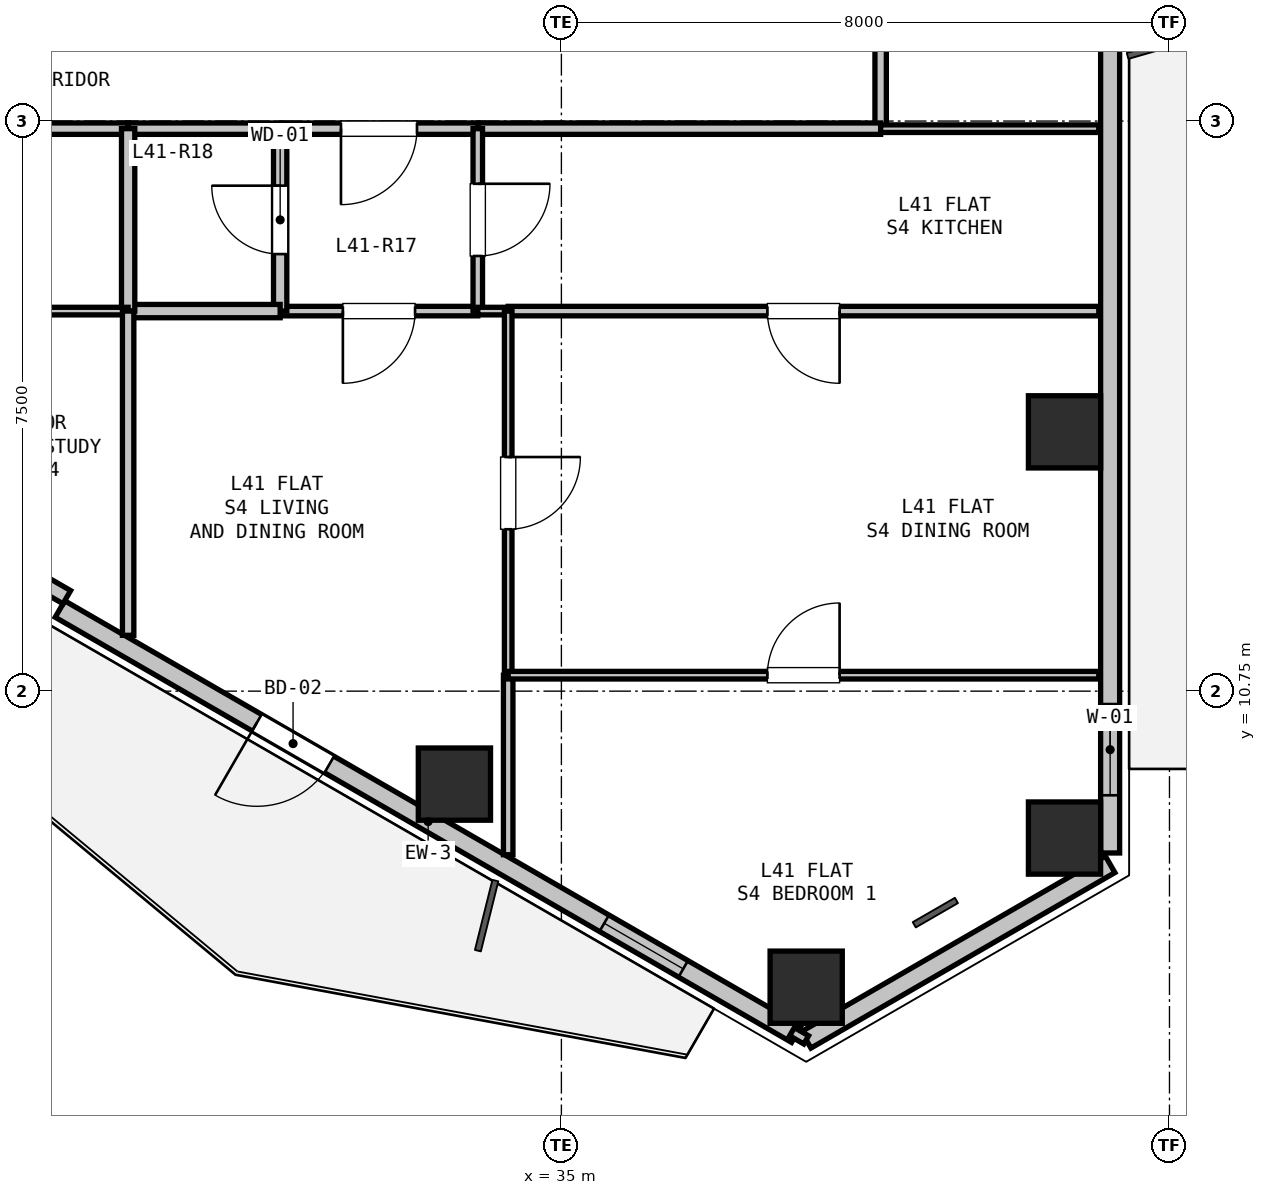
"""IFC4 building model, lengths in metres.
Left out: names, types, materials, properties, quantities, classifications, styles, units other than length and angle.
Written with IfcOpenShell. Run it as: python <this file> out.ifc"""

import sys

from ifc_helpers import new_model, si_unit, direction, frame, frame_2d, origin, origin_2d, place, context, subcontext, project, spatial, rectangle, hollow_rectangle, extrude, element, fill, save


model = new_model("IFC4")
c1 = context("Model", 3, precision=1e-05, world=origin(), true_north=direction((0.0, 1.0)))
c2 = subcontext(c1, "Body", "Model", "MODEL_VIEW")
j1 = project(units=[si_unit("LENGTHUNIT", "METRE"), si_unit("PLANEANGLEUNIT", "RADIAN")], contexts=[c1])
p1 = place(None, origin())
s1 = spatial("IfcSite", under=j1, at=p1, CompositionType="ELEMENT")
p2 = place(p1, origin())
s2 = spatial("IfcBuilding", under=s1, at=p2, CompositionType="ELEMENT")
p3 = place(p2, frame((0.0, 0.0, 147.6)))
s3 = spatial("IfcBuildingStorey", under=s2, at=p3, CompositionType="ELEMENT", Elevation=147.6)
for number, where, z_axis, x_axis in (
    (1, (41.619, 14.161, 0.0), (0.0, 0.0, 1.0), (1.0, 0.0, 0.0)),
    (2, (41.619, 8.817, 0.0), (0.0, 0.0, 1.0), (1.0, 0.0, 0.0)),
    (3, (38.22, 6.855, 0.0), (0.0, 0.0, 1.0), (1.0, 0.0, 0.0)),
    (4, (33.593, 9.527, 0.0), (0.0, 0.0, 1.0), (1.0, 0.0, 0.0)),
):
    element("IfcColumn", number, at=place(p3, frame(where, z_axis=z_axis, x_axis=x_axis)), inside=s3, PredefinedType="COLUMN", context=c2, shape_type="SweptSolid", body=[
        extrude(hollow_rectangle(XDim=0.95, YDim=0.95, WallThickness=0.028, at=origin_2d()), origin(), (0.0, 0.0, 1.0), 3.3),
    ])
p4 = place(p3, frame((42.219, 8.471, 0.0), z_axis=(0.0, 0.0, 1.0), x_axis=(-0.866035021055, -0.499983342029, 0.0)))
e5 = element("IfcWall", 5, at=p4, inside=s3, PredefinedType="SOLIDWALL", context=c2, shape_type="SweptSolid", body=[
    extrude(rectangle(XDim=4.617, YDim=0.25, at=frame_2d((2.309, 0.0))), origin(), (0.0, 0.0, 1.0), 2.68),
])
p5 = place(p3, frame((42.219, 19.807, 0.0), z_axis=(0.0, 0.0, 1.0), x_axis=(0.0, -1.0, 0.0)))
e6 = element("IfcWall", 6, at=p5, inside=s3, PredefinedType="SOLIDWALL", context=c2, shape_type="SweptSolid", body=[
    extrude(rectangle(XDim=11.186, YDim=0.25, at=frame_2d((5.593, 0.0))), origin(), (0.0, 0.0, 1.0), 2.68),
])
p6 = place(p5, frame((9.227, 0.0, 0.9)))
e7 = element("IfcOpeningElement", 7, at=p6, cuts=e6, PredefinedType="OPENING", context=c2, shape_type="SweptSolid", body=[
    extrude(rectangle(XDim=1.2, YDim=1.4, at=frame_2d((0.6, 0.7))), frame((0.0, 0.135, 0.0), z_axis=(0.0, -1.0, 0.0), x_axis=(1.0, 0.0, 0.0)), (0.0, 0.0, 1.0), 0.27),
])
p7 = place(p3, frame((38.091, 6.237, 0.0), z_axis=(0.0, 0.0, 1.0), x_axis=(-0.86602239209, 0.500005216371, 0.0)))
e8 = element("IfcWall", 8, at=p7, inside=s3, PredefinedType="SOLIDWALL", context=c2, shape_type="SweptSolid", body=[
    extrude(rectangle(XDim=11.186, YDim=0.25, at=frame_2d((5.593, 0.0))), origin(), (0.0, 0.0, 1.0), 2.68),
])
p8 = place(p7, frame((7.095, 0.0, 0.0)))
e9 = element("IfcOpeningElement", 9, at=p8, cuts=e8, PredefinedType="OPENING", context=c2, shape_type="SweptSolid", body=[
    extrude(rectangle(XDim=1.1, YDim=2.1, at=frame_2d((0.55, 1.05))), frame((0.0, 0.135, 0.0), z_axis=(0.0, -1.0, 0.0), x_axis=(1.0, 0.0, 0.0)), (0.0, 0.0, 1.0), 0.27),
])
p9 = place(p7, frame((1.718, 0.0, 0.9)))
e10 = element("IfcOpeningElement", 10, at=p9, cuts=e8, PredefinedType="OPENING", context=c2, shape_type="SweptSolid", body=[
    extrude(rectangle(XDim=1.2, YDim=1.4, at=frame_2d((0.6, 0.7))), frame((0.0, 0.135, 0.0), z_axis=(0.0, -1.0, 0.0), x_axis=(1.0, 0.0, 0.0)), (0.0, 0.0, 1.0), 0.27),
])
p10 = place(p3, frame((28.493, 11.986, 0.0), z_axis=(0.0, 0.0, 1.0), x_axis=(-0.86605165483, 0.499954529098, 0.0)))
e11 = element("IfcWall", 11, at=p10, inside=s3, PredefinedType="PARAPET", context=c2, shape_type="SweptSolid", body=[
    extrude(rectangle(XDim=1.7, YDim=0.2, at=frame_2d((0.85, 0.0))), origin(), (0.0, 0.0, 1.0), 2.68),
])
p11 = place(p3, frame((39.2, 19.9, 0.0), z_axis=(0.0, 0.0, 1.0), x_axis=(0.0, -1.0, 0.0)))
e12 = element("IfcWall", 12, at=p11, inside=s3, PredefinedType="PARTITIONING", context=c2, shape_type="SweptSolid", body=[
    extrude(rectangle(XDim=1.75, YDim=0.15, at=frame_2d((0.875, 0.0))), origin(), (0.0, 0.0, 1.0), 3.06),
])
p12 = place(p3, frame((39.2, 18.15, 0.0), z_axis=(0.0, 0.0, 1.0), x_axis=(-1.0, 0.0, 0.0)))
e13 = element("IfcWall", 13, at=p12, inside=s3, PredefinedType="PARTITIONING", context=c2, shape_type="SweptSolid", body=[
    extrude(rectangle(XDim=5.3, YDim=0.15, at=frame_2d((2.65, 0.0))), origin(), (0.0, 0.0, 1.0), 2.433),
])
p13 = place(p3, frame((33.9, 18.15, 0.0), z_axis=(0.0, 0.0, 1.0), x_axis=(-1.0, 0.0, 0.0)))
e14 = element("IfcWall", 14, at=p13, inside=s3, PredefinedType="PARTITIONING", context=c2, shape_type="SweptSolid", body=[
    extrude(rectangle(XDim=2.6, YDim=0.15, at=frame_2d((1.3, 0.0))), origin(), (0.0, 0.0, 1.0), 3.06),
])
p14 = place(p13, frame((0.8, 0.0, 0.0)))
e15 = element("IfcOpeningElement", 15, at=p14, cuts=e14, PredefinedType="OPENING", context=c2, shape_type="SweptSolid", body=[
    extrude(rectangle(XDim=1.0, YDim=2.15, at=frame_2d((0.5, 1.075))), frame((0.0, 0.085, 0.0), z_axis=(0.0, -1.0, 0.0), x_axis=(1.0, 0.0, 0.0)), (0.0, 0.0, 1.0), 0.17),
])
p15 = place(p3, frame((31.3, 18.15, 0.0), z_axis=(0.0, 0.0, 1.0), x_axis=(-1.0, 0.0, 0.0)))
e16 = element("IfcWall", 16, at=p15, inside=s3, PredefinedType="PARTITIONING", context=c2, shape_type="SweptSolid", body=[
    extrude(rectangle(XDim=2.0, YDim=0.15, at=frame_2d((1.0, 0.0))), origin(), (0.0, 0.0, 1.0), 3.06),
])
p16 = place(p3, frame((29.3, 18.15, 0.0), z_axis=(0.0, 0.0, 1.0), x_axis=(-1.0, 0.0, 0.0)))
e17 = element("IfcWall", 17, at=p16, inside=s3, PredefinedType="PARTITIONING", context=c2, shape_type="SweptSolid", body=[
    extrude(rectangle(XDim=2.2, YDim=0.15, at=frame_2d((1.1, 0.0))), origin(), (0.0, 0.0, 1.0), 3.06),
])
p17 = place(p3, frame((33.9, 15.75, 0.0), z_axis=(0.0, 0.0, 1.0), x_axis=(-1.0, 0.0, 0.0)))
e18 = element("IfcWall", 18, at=p17, inside=s3, PredefinedType="PARTITIONING", context=c2, shape_type="SweptSolid", body=[
    extrude(rectangle(XDim=2.6, YDim=0.125, at=frame_2d((1.3, 0.0))), origin(), (0.0, 0.0, 1.0), 3.06),
])
p18 = place(p17, frame((0.825, 0.0, 0.0)))
e19 = element("IfcOpeningElement", 19, at=p18, cuts=e18, PredefinedType="OPENING", context=c2, shape_type="SweptSolid", body=[
    extrude(rectangle(XDim=0.95, YDim=2.1, at=frame_2d((0.475, 1.05))), frame((0.0, 0.073, 0.0), z_axis=(0.0, -1.0, 0.0), x_axis=(1.0, 0.0, 0.0)), (0.0, 0.0, 1.0), 0.145),
])
p19 = place(p3, frame((31.3, 15.75, 0.0), z_axis=(0.0, 0.0, 1.0), x_axis=(0.0, 1.0, 0.0)))
e20 = element("IfcWall", 20, at=p19, inside=s3, PredefinedType="PLUMBINGWALL", context=c2, shape_type="SweptSolid", body=[
    extrude(rectangle(XDim=2.4, YDim=0.175, at=frame_2d((1.2, 0.0))), origin(), (0.0, 0.0, 1.0), 3.06),
])
p20 = place(p19, frame((0.75, 0.0, 0.0)))
e21 = element("IfcOpeningElement", 21, at=p20, cuts=e20, PredefinedType="OPENING", context=c2, shape_type="SweptSolid", body=[
    extrude(rectangle(XDim=0.9, YDim=2.1, at=frame_2d((0.45, 1.05))), frame((0.0, 0.097, 0.0), z_axis=(0.0, -1.0, 0.0), x_axis=(1.0, 0.0, 0.0)), (0.0, 0.0, 1.0), 0.195),
])
p21 = place(p3, frame((33.9, 18.15, 0.0), z_axis=(0.0, 0.0, 1.0), x_axis=(0.0, -1.0, 0.0)))
e22 = element("IfcWall", 22, at=p21, inside=s3, PredefinedType="PARTITIONING", context=c2, shape_type="SweptSolid", body=[
    extrude(rectangle(XDim=2.4, YDim=0.125, at=frame_2d((1.2, 0.0))), origin(), (0.0, 0.0, 1.0), 3.06),
])
p22 = place(p21, frame((0.725, 0.0, 0.0)))
e23 = element("IfcOpeningElement", 23, at=p22, cuts=e22, PredefinedType="OPENING", context=c2, shape_type="SweptSolid", body=[
    extrude(rectangle(XDim=0.95, YDim=2.1, at=frame_2d((0.475, 1.05))), frame((0.0, 0.073, 0.0), z_axis=(0.0, -1.0, 0.0), x_axis=(1.0, 0.0, 0.0)), (0.0, 0.0, 1.0), 0.145),
])
p23 = place(p3, frame((31.3, 15.75, 0.0), z_axis=(0.0, 0.0, 1.0), x_axis=(-1.0, 0.0, 0.0)))
e24 = element("IfcWall", 24, at=p23, inside=s3, PredefinedType="PLUMBINGWALL", context=c2, shape_type="SweptSolid", body=[
    extrude(rectangle(XDim=2.0, YDim=0.175, at=frame_2d((1.0, 0.0))), origin(), (0.0, 0.0, 1.0), 3.06),
])
p24 = place(p3, frame((29.3, 15.75, 0.0), z_axis=(0.0, 0.0, 1.0), x_axis=(0.0, 1.0, 0.0)))
e25 = element("IfcWall", 25, at=p24, inside=s3, PredefinedType="PLUMBINGWALL", context=c2, shape_type="SweptSolid", body=[
    extrude(rectangle(XDim=2.4, YDim=0.175, at=frame_2d((1.2, 0.0))), origin(), (0.0, 0.0, 1.0), 3.06),
])
p25 = place(p3, frame((39.2, 18.15, 0.0), z_axis=(0.0, 0.0, 1.0), x_axis=(1.0, 0.0, 0.0)))
e26 = element("IfcWall", 26, at=p25, inside=s3, PredefinedType="PARTITIONING", context=c2, shape_type="SweptSolid", body=[
    extrude(rectangle(XDim=2.87, YDim=0.1, at=frame_2d((1.435, 0.0))), origin(), (0.0, 0.0, 1.0), 2.365),
])
p26 = place(p3, frame((42.07, 15.75, 0.0), z_axis=(0.0, 0.0, 1.0), x_axis=(-1.0, 0.0, 0.0)))
e27 = element("IfcWall", 27, at=p26, inside=s3, PredefinedType="PARTITIONING", context=c2, shape_type="SweptSolid", body=[
    extrude(rectangle(XDim=7.77, YDim=0.125, at=frame_2d((3.885, 0.0))), origin(), (0.0, 0.0, 1.0), 2.365),
])
p27 = place(p26, frame((3.41, 0.0, 0.0)))
e28 = element("IfcOpeningElement", 28, at=p27, cuts=e27, PredefinedType="OPENING", context=c2, shape_type="SweptSolid", body=[
    extrude(rectangle(XDim=0.95, YDim=2.1, at=frame_2d((0.475, 1.05))), frame((0.0, 0.073, 0.0), z_axis=(0.0, -1.0, 0.0), x_axis=(1.0, 0.0, 0.0)), (0.0, 0.0, 1.0), 0.145),
])
p28 = place(p3, frame((34.3, 15.75, 0.0), z_axis=(0.0, 0.0, 1.0), x_axis=(-1.0, 0.0, 0.0)))
e29 = element("IfcWall", 29, at=p28, inside=s3, PredefinedType="PARTITIONING", context=c2, shape_type="SweptSolid", body=[
    extrude(rectangle(XDim=0.4, YDim=0.1, at=frame_2d((0.2, 0.0))), origin(), (0.0, 0.0, 1.0), 3.06),
])
p29 = place(p3, frame((27.1, 15.75, 0.0), z_axis=(0.0, 0.0, 1.0), x_axis=(1.0, 0.0, 0.0)))
e30 = element("IfcWall", 30, at=p29, inside=s3, PredefinedType="PARTITIONING", context=c2, shape_type="SweptSolid", body=[
    extrude(rectangle(XDim=2.2, YDim=0.1, at=frame_2d((1.1, 0.0))), origin(), (0.0, 0.0, 1.0), 2.433),
])
p30 = place(p3, frame((29.3, 15.75, 0.0), z_axis=(0.0, 0.0, 1.0), x_axis=(0.0, -1.0, 0.0)))
e31 = element("IfcWall", 31, at=p30, inside=s3, PredefinedType="PARTITIONING", context=c2, shape_type="SweptSolid", body=[
    extrude(rectangle(XDim=4.265, YDim=0.15, at=frame_2d((2.133, 0.0))), origin(), (0.0, 0.0, 1.0), 2.365),
])
p31 = place(p3, frame((34.3, 15.75, 0.0), z_axis=(0.0, 0.0, 1.0), x_axis=(0.0, -1.0, 0.0)))
e32 = element("IfcWall", 32, at=p31, inside=s3, PredefinedType="PARTITIONING", context=c2, shape_type="SweptSolid", body=[
    extrude(rectangle(XDim=4.79, YDim=0.1, at=frame_2d((2.395, 0.0))), origin(), (0.0, 0.0, 1.0), 3.06),
])
p32 = place(p31, frame((1.92, 0.0, 0.0)))
e33 = element("IfcOpeningElement", 33, at=p32, cuts=e32, PredefinedType="OPENING", context=c2, shape_type="SweptSolid", body=[
    extrude(rectangle(XDim=0.95, YDim=2.1, at=frame_2d((0.475, 1.05))), frame((0.0, 0.06, 0.0), z_axis=(0.0, -1.0, 0.0), x_axis=(1.0, 0.0, 0.0)), (0.0, 0.0, 1.0), 0.12),
])
p33 = place(p3, frame((34.3, 10.96, 0.0), z_axis=(0.0, 0.0, 1.0), x_axis=(0.0, -1.0, 0.0)))
e34 = element("IfcWall", 34, at=p33, inside=s3, PredefinedType="PARTITIONING", context=c2, shape_type="SweptSolid", body=[
    extrude(rectangle(XDim=2.362, YDim=0.125, at=frame_2d((1.181, 0.0))), origin(), (0.0, 0.0, 1.0), 2.724),
])
p34 = place(p3, frame((34.3, 10.96, 0.0), z_axis=(0.0, 0.0, 1.0), x_axis=(1.0, 0.0, 0.0)))
e35 = element("IfcWall", 35, at=p34, inside=s3, PredefinedType="PARTITIONING", context=c2, shape_type="SweptSolid", body=[
    extrude(rectangle(XDim=7.77, YDim=0.1, at=frame_2d((3.885, 0.0))), origin(), (0.0, 0.0, 1.0), 2.433),
])
p35 = place(p34, frame((3.41, 0.0, 0.0)))
e36 = element("IfcOpeningElement", 36, at=p35, cuts=e35, PredefinedType="OPENING", context=c2, shape_type="SweptSolid", body=[
    extrude(rectangle(XDim=0.95, YDim=2.1, at=frame_2d((0.475, 1.05))), frame((0.0, 0.06, 0.0), z_axis=(0.0, -1.0, 0.0), x_axis=(1.0, 0.0, 0.0)), (0.0, 0.0, 1.0), 0.12),
])
p36 = place(p3, frame((38.221, 6.162, 0.0), z_axis=(0.0, 0.0, 1.0), x_axis=(-0.865581379588, 0.500768285049, 0.0)))
e37 = element("IfcWall", 37, at=p36, inside=s3, PredefinedType="PARTITIONING", context=c2, shape_type="SweptSolid", body=[
    extrude(rectangle(XDim=0.216, YDim=0.125, at=frame_2d((0.108, 0.0))), origin(), (0.0, 0.0, 1.0), 3.06),
])
p37 = place(p6, origin())
e38 = element("IfcWindow", 38, at=p37, inside=s3, PartitioningType="SINGLE_PANEL", PredefinedType="WINDOW", context=c2, shape_type="SweptSolid", body=[
    extrude(rectangle(XDim=1.2, YDim=1.4, at=frame_2d((0.6, 0.7))), frame((0.0, 0.03, 0.0), z_axis=(0.0, -1.0, 0.0), x_axis=(1.0, 0.0, 0.0)), (0.0, 0.0, 1.0), 0.06),
])
fill(e7, e38)
p38 = place(p8, origin())
e39 = element("IfcDoor", 39, at=p38, inside=s3, OperationType="SINGLE_SWING_RIGHT", PredefinedType="DOOR", context=c2, shape_type="SweptSolid", body=[
    extrude(rectangle(XDim=1.1, YDim=2.1, at=frame_2d((0.55, 1.05))), frame((0.0, 0.025, 0.0), z_axis=(0.0, -1.0, 0.0), x_axis=(1.0, 0.0, 0.0)), (0.0, 0.0, 1.0), 0.05),
])
fill(e9, e39)
p39 = place(p9, origin())
e40 = element("IfcWindow", 40, at=p39, inside=s3, PartitioningType="SINGLE_PANEL", PredefinedType="WINDOW", context=c2, shape_type="SweptSolid", body=[
    extrude(rectangle(XDim=1.2, YDim=1.4, at=frame_2d((0.6, 0.7))), frame((0.0, 0.03, 0.0), z_axis=(0.0, -1.0, 0.0), x_axis=(1.0, 0.0, 0.0)), (0.0, 0.0, 1.0), 0.06),
])
fill(e10, e40)
p40 = place(p14, origin())
e41 = element("IfcDoor", 41, at=p40, inside=s3, OperationType="SINGLE_SWING_RIGHT", PredefinedType="DOOR", context=c2, shape_type="SweptSolid", body=[
    extrude(rectangle(XDim=1.0, YDim=2.15, at=frame_2d((0.5, 1.075))), frame((0.0, 0.025, 0.0), z_axis=(0.0, -1.0, 0.0), x_axis=(1.0, 0.0, 0.0)), (0.0, 0.0, 1.0), 0.05),
])
fill(e15, e41)
p41 = place(p20, origin())
e42 = element("IfcDoor", 42, at=p41, inside=s3, OperationType="SINGLE_SWING_RIGHT", PredefinedType="DOOR", context=c2, shape_type="SweptSolid", body=[
    extrude(rectangle(XDim=0.9, YDim=2.1, at=frame_2d((0.45, 1.05))), frame((0.0, 0.025, 0.0), z_axis=(0.0, -1.0, 0.0), x_axis=(1.0, 0.0, 0.0)), (0.0, 0.0, 1.0), 0.05),
])
fill(e21, e42)
p42 = place(p22, origin())
e43 = element("IfcDoor", 43, at=p42, inside=s3, OperationType="SINGLE_SWING_LEFT", PredefinedType="DOOR", context=c2, shape_type="SweptSolid", body=[
    extrude(rectangle(XDim=0.95, YDim=2.1, at=frame_2d((0.475, 1.05))), frame((0.0, 0.025, 0.0), z_axis=(0.0, -1.0, 0.0), x_axis=(1.0, 0.0, 0.0)), (0.0, 0.0, 1.0), 0.05),
])
fill(e23, e43)
p43 = place(p18, origin())
e44 = element("IfcDoor", 44, at=p43, inside=s3, OperationType="SINGLE_SWING_RIGHT", PredefinedType="DOOR", context=c2, shape_type="SweptSolid", body=[
    extrude(rectangle(XDim=0.95, YDim=2.1, at=frame_2d((0.475, 1.05))), frame((0.0, 0.025, 0.0), z_axis=(0.0, -1.0, 0.0), x_axis=(1.0, 0.0, 0.0)), (0.0, 0.0, 1.0), 0.05),
])
fill(e19, e44)
p44 = place(p27, origin())
e45 = element("IfcDoor", 45, at=p44, inside=s3, OperationType="SINGLE_SWING_LEFT", PredefinedType="DOOR", context=c2, shape_type="SweptSolid", body=[
    extrude(rectangle(XDim=0.95, YDim=2.1, at=frame_2d((0.475, 1.05))), frame((0.0, 0.025, 0.0), z_axis=(0.0, -1.0, 0.0), x_axis=(1.0, 0.0, 0.0)), (0.0, 0.0, 1.0), 0.05),
])
fill(e28, e45)
p45 = place(p32, origin())
e46 = element("IfcDoor", 46, at=p45, inside=s3, OperationType="SINGLE_SWING_LEFT", PredefinedType="DOOR", context=c2, shape_type="SweptSolid", body=[
    extrude(rectangle(XDim=0.95, YDim=2.1, at=frame_2d((0.475, 1.05))), frame((0.0, 0.025, 0.0), z_axis=(0.0, -1.0, 0.0), x_axis=(1.0, 0.0, 0.0)), (0.0, 0.0, 1.0), 0.05),
])
fill(e33, e46)
p46 = place(p35, origin())
e47 = element("IfcDoor", 47, at=p46, inside=s3, OperationType="SINGLE_SWING_RIGHT", PredefinedType="DOOR", context=c2, shape_type="SweptSolid", body=[
    extrude(rectangle(XDim=0.95, YDim=2.1, at=frame_2d((0.475, 1.05))), frame((0.0, 0.025, 0.0), z_axis=(0.0, -1.0, 0.0), x_axis=(1.0, 0.0, 0.0)), (0.0, 0.0, 1.0), 0.05),
])
fill(e36, e47)
save(model, sys.argv[1])
